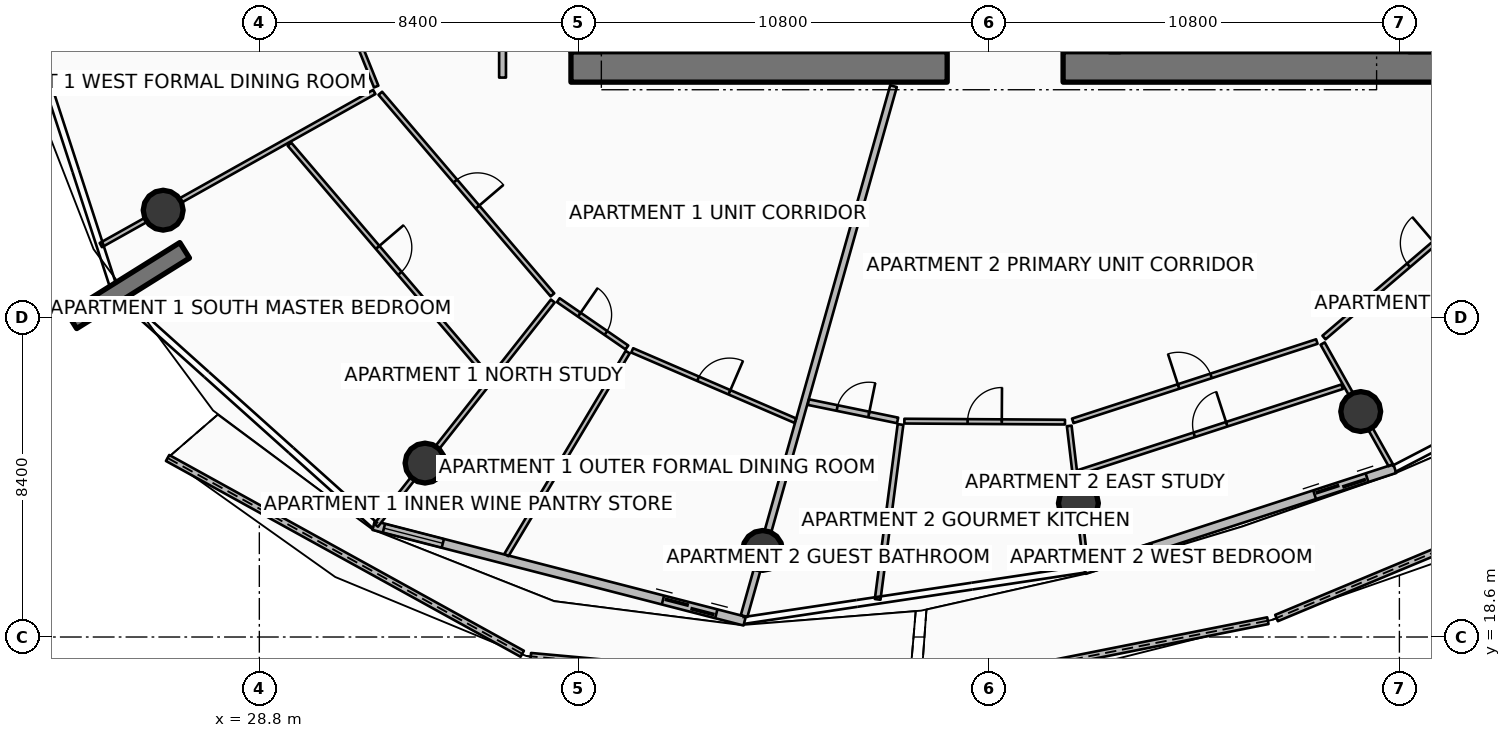
"""IFC4 building model, lengths in metres.
Left out: names, types, materials, properties, quantities, classifications, styles, units other than length and angle.
Written with IfcOpenShell. Run it as: python <this file> out.ifc"""

import sys

from ifc_helpers import new_model, si_unit, direction, frame, frame_2d, origin, origin_2d, place, context, subcontext, project, spatial, polyline, rectangle, circle, outline, extrude, element, fill, save


model = new_model("IFC4")
c1 = context("Model", 3, precision=1e-05, world=origin(), true_north=direction((0.0, 1.0)))
c2 = subcontext(c1, "Body", "Model", "MODEL_VIEW")
j1 = project(units=[si_unit("LENGTHUNIT", "METRE"), si_unit("PLANEANGLEUNIT", "RADIAN")], contexts=[c1])
p1 = place(None, origin())
s1 = spatial("IfcSite", under=j1, at=p1, CompositionType="ELEMENT")
p2 = place(p1, origin())
s2 = spatial("IfcBuilding", under=s1, at=p2, CompositionType="ELEMENT")
p3 = place(p2, frame((0.0, 0.0, 165.3)))
s3 = spatial("IfcBuildingStorey", under=s2, at=p3, CompositionType="ELEMENT", Elevation=165.3)
p4 = place(p3, frame((37.0, 33.6, 0.0), z_axis=(0.0, 0.0, 1.0), x_axis=(1.0, 0.0, 0.0)))
e1 = element("IfcWall", 1, at=p4, inside=s3, PredefinedType="SHEAR", context=c2, shape_type="SweptSolid", body=[
    extrude(rectangle(XDim=9.9, YDim=0.8, at=frame_2d((4.95, 0.0))), origin(), (0.0, 0.0, 1.0), 3.75),
])
p5 = place(p3, frame((49.95, 33.6, 0.0), z_axis=(0.0, 0.0, 1.0), x_axis=(1.0, 0.0, 0.0)))
e2 = element("IfcWall", 2, at=p5, inside=s3, PredefinedType="SHEAR", context=c2, shape_type="SweptSolid", body=[
    extrude(rectangle(XDim=9.9, YDim=0.8, at=frame_2d((4.95, 0.0))), origin(), (0.0, 0.0, 1.0), 3.75),
])
p6 = place(p3, frame((26.835, 28.774, 0.0), z_axis=(0.0, 0.0, 1.0), x_axis=(-0.848053161125, -0.529911158502, 0.0)))
e3 = element("IfcWall", 3, at=p6, inside=s3, PredefinedType="SOLIDWALL", context=c2, shape_type="SweptSolid", body=[
    extrude(rectangle(XDim=3.5, YDim=0.48, at=frame_2d((1.75, 0.0))), origin(), (0.0, 0.0, 1.0), 3.75),
])
for number, where, z_axis, x_axis in (
    (4, (26.27, 29.831, 0.0), (0.0, 0.0, 1.0), (1.0, 0.0, 0.0)),
    (5, (33.16, 23.176, 0.0), (0.0, 0.0, 1.0), (1.0, 0.0, 0.0)),
    (6, (42.043, 20.878, 0.0), (0.0, 0.0, 1.0), (1.0, 0.0, 0.0)),
    (7, (50.353, 22.119, 0.0), (0.0, 0.0, 1.0), (1.0, 0.0, 0.0)),
    (8, (57.782, 24.533, 0.0), (0.0, 0.0, 1.0), (1.0, 0.0, 0.0)),
):
    element("IfcColumn", number, at=place(p3, frame(where, z_axis=z_axis, x_axis=x_axis)), inside=s3, PredefinedType="COLUMN", context=c2, shape_type="SweptSolid", body=[
        extrude(circle(Radius=0.525, at=origin_2d()), origin(), (0.0, 0.0, 1.0), 3.5),
    ])
p7 = place(p3, frame((26.386, 23.311, 0.0), z_axis=(0.0, 0.0, 1.0), x_axis=(0.875451711427, -0.483305597897, 0.0)))
e9 = element("IfcWall", 9, at=p7, inside=s3, PredefinedType="PARAPET", context=c2, shape_type="SweptSolid", body=[
    extrude(outline(polyline([(0.0, 0.0), (10.659, 0.0), (10.659, 1.148), (5.33, 1.127), (0.0, 1.224), (0.0, 0.0)])), frame((0.0, 0.09, 0.0), z_axis=(0.0, -1.0, 0.0), x_axis=(1.0, 0.0, 0.0)), (0.0, 0.0, 1.0), 0.18),
])
p8 = place(p3, frame((35.942, 18.091, 0.0), z_axis=(0.0, 0.0, 1.0), x_axis=(0.995910609801, -0.09034410487, 0.0)))
e10 = element("IfcWall", 10, at=p8, inside=s3, PredefinedType="PARAPET", context=c2, shape_type="SweptSolid", body=[
    extrude(outline(polyline([(0.0, 0.0), (9.993, 0.0), (9.993, 1.483), (4.997, 1.284), (0.0, 1.148), (0.0, 0.0)])), frame((0.0, 0.09, 0.0), z_axis=(0.0, -1.0, 0.0), x_axis=(1.0, 0.0, 0.0)), (0.0, 0.0, 1.0), 0.18),
])
p9 = place(p3, frame((46.201, 17.213, 0.0), z_axis=(0.0, 0.0, 1.0), x_axis=(0.980810829075, 0.194961836188, 0.0)))
e11 = element("IfcWall", 11, at=p9, inside=s3, PredefinedType="PARAPET", context=c2, shape_type="SweptSolid", body=[
    extrude(outline(polyline([(0.0, 0.0), (9.315, 0.0), (9.315, 1.832), (4.658, 1.696), (0.0, 1.497), (0.0, 0.0)])), frame((0.0, 0.09, 0.0), z_axis=(0.0, -1.0, 0.0), x_axis=(1.0, 0.0, 0.0)), (0.0, 0.0, 1.0), 0.18),
])
p10 = place(p3, frame((55.567, 19.099, 0.0), z_axis=(0.0, 0.0, 1.0), x_axis=(0.922918869306, 0.384994494349, 0.0)))
e12 = element("IfcWall", 12, at=p10, inside=s3, PredefinedType="PARAPET", context=c2, shape_type="SweptSolid", body=[
    extrude(outline(polyline([(0.0, 0.0), (9.419, 0.0), (9.419, 1.756), (4.709, 1.853), (0.0, 1.832), (0.0, 0.0)])), frame((0.0, 0.09, 0.0), z_axis=(0.0, -1.0, 0.0), x_axis=(1.0, 0.0, 0.0)), (0.0, 0.0, 1.0), 0.18),
])
p11 = place(p3, frame((31.808, 21.534, 0.0), z_axis=(0.0, 0.0, 1.0), x_axis=(0.968379685126, -0.249481032214, 0.0)))
e13 = element("IfcWall", 13, at=p11, inside=s3, PredefinedType="SOLIDWALL", context=c2, shape_type="SweptSolid", body=[
    extrude(rectangle(XDim=10.082, YDim=0.24, at=frame_2d((5.041, 0.0))), origin(), (0.0, 0.0, 1.0), 2.45),
])
p12 = place(p11, frame((7.862, 0.0, 0.0)))
e14 = element("IfcOpeningElement", 14, at=p12, cuts=e13, PredefinedType="OPENING", context=c2, shape_type="SweptSolid", body=[
    extrude(rectangle(XDim=1.45, YDim=2.15, at=frame_2d((0.725, 1.075))), frame((0.0, 0.13, 0.0), z_axis=(0.0, -1.0, 0.0), x_axis=(1.0, 0.0, 0.0)), (0.0, 0.0, 1.0), 0.26),
])
p13 = place(p11, frame((0.28, 0.0, 0.65)))
e15 = element("IfcOpeningElement", 15, at=p13, cuts=e13, PredefinedType="OPENING", context=c2, shape_type="SweptSolid", body=[
    extrude(rectangle(XDim=1.6, YDim=1.5, at=frame_2d((0.8, 0.75))), frame((0.0, 0.13, 0.0), z_axis=(0.0, -1.0, 0.0), x_axis=(1.0, 0.0, 0.0)), (0.0, 0.0, 1.0), 0.26),
])
p14 = place(p3, frame((50.51, 20.376, 0.0), z_axis=(0.0, 0.0, 1.0), x_axis=(0.951046390632, 0.309048156224, 0.0)))
e16 = element("IfcWall", 16, at=p14, inside=s3, PredefinedType="SOLIDWALL", context=c2, shape_type="SweptSolid", body=[
    extrude(rectangle(XDim=8.59, YDim=0.24, at=frame_2d((4.295, 0.0))), origin(), (0.0, 0.0, 1.0), 2.45),
])
p15 = place(p14, frame((6.37, 0.0, 0.0)))
e17 = element("IfcOpeningElement", 17, at=p15, cuts=e16, PredefinedType="OPENING", context=c2, shape_type="SweptSolid", body=[
    extrude(rectangle(XDim=1.45, YDim=2.15, at=frame_2d((0.725, 1.075))), frame((0.0, 0.13, 0.0), z_axis=(0.0, -1.0, 0.0), x_axis=(1.0, 0.0, 0.0)), (0.0, 0.0, 1.0), 0.26),
])
p16 = place(p14, frame((0.28, 0.0, 0.65)))
e18 = element("IfcOpeningElement", 18, at=p16, cuts=e16, PredefinedType="OPENING", context=c2, shape_type="SweptSolid", body=[
    extrude(rectangle(XDim=1.6, YDim=1.5, at=frame_2d((0.8, 0.75))), frame((0.0, 0.13, 0.0), z_axis=(0.0, -1.0, 0.0), x_axis=(1.0, 0.0, 0.0)), (0.0, 0.0, 1.0), 0.26),
])
p17 = place(p3, frame((45.488, 33.094, 0.0), z_axis=(0.0, 0.0, 1.0), x_axis=(-0.271442952208, -0.962454530717, 0.0)))
e19 = element("IfcWall", 19, at=p17, inside=s3, PredefinedType="PARTITIONING", context=c2, shape_type="SweptSolid", body=[
    extrude(rectangle(XDim=14.486, YDim=0.18, at=frame_2d((7.243, 0.0))), origin(), (0.0, 0.0, 1.0), 2.94),
])
p18 = place(p3, frame((30.185, 37.284, 0.0), z_axis=(0.0, 0.0, 1.0), x_axis=(0.373193309098, -0.927753606322, 0.0)))
e20 = element("IfcWall", 20, at=p18, inside=s3, PredefinedType="PARTITIONING", context=c2, shape_type="SweptSolid", body=[
    extrude(rectangle(XDim=4.528, YDim=0.125, at=frame_2d((2.264, 0.0))), origin(), (0.0, 0.0, 1.0), 2.94),
])
p19 = place(p18, frame((1.814, 0.0, 0.0)))
e21 = element("IfcOpeningElement", 21, at=p19, cuts=e20, PredefinedType="OPENING", context=c2, shape_type="SweptSolid", body=[
    extrude(rectangle(XDim=0.9, YDim=2.08, at=frame_2d((0.45, 1.04))), frame((0.0, 0.073, 0.0), z_axis=(0.0, -1.0, 0.0), x_axis=(1.0, 0.0, 0.0)), (0.0, 0.0, 1.0), 0.145),
])
p20 = place(p3, frame((35.2, 34.712, 0.0), z_axis=(0.0, 0.0, 1.0), x_axis=(0.0, -1.0, 0.0)))
e22 = element("IfcWall", 22, at=p20, inside=s3, PredefinedType="PARTITIONING", context=c2, shape_type="SweptSolid", body=[
    extrude(rectangle(XDim=1.392, YDim=0.18, at=frame_2d((0.696, 0.0))), origin(), (0.0, 0.0, 1.0), 2.94),
])
p21 = place(p3, frame((31.825, 32.941, 0.0), z_axis=(0.0, 0.0, 1.0), x_axis=(-0.872491881101, -0.488628608877, 0.0)))
e23 = element("IfcWall", 23, at=p21, inside=s3, PredefinedType="PARTITIONING", context=c2, shape_type="SweptSolid", body=[
    extrude(rectangle(XDim=8.247, YDim=0.125, at=frame_2d((4.124, 0.0))), origin(), (0.0, 0.0, 1.0), 2.94),
])
p22 = place(p3, frame((31.983, 32.907, 0.0), z_axis=(0.0, 0.0, 1.0), x_axis=(0.649447060425, -0.76040680935, 0.0)))
e24 = element("IfcWall", 24, at=p22, inside=s3, PredefinedType="PARTITIONING", context=c2, shape_type="SweptSolid", body=[
    extrude(rectangle(XDim=6.975, YDim=0.125, at=frame_2d((3.487, 0.0))), origin(), (0.0, 0.0, 1.0), 2.94),
])
p23 = place(p22, frame((3.037, 0.0, 0.0)))
e25 = element("IfcOpeningElement", 25, at=p23, cuts=e24, PredefinedType="OPENING", context=c2, shape_type="SweptSolid", body=[
    extrude(rectangle(XDim=0.9, YDim=2.08, at=frame_2d((0.45, 1.04))), frame((0.0, 0.073, 0.0), z_axis=(0.0, -1.0, 0.0), x_axis=(1.0, 0.0, 0.0)), (0.0, 0.0, 1.0), 0.145),
])
p24 = place(p3, frame((29.593, 31.568, 0.0), z_axis=(0.0, 0.0, 1.0), x_axis=(0.649460624158, -0.760395224649, 0.0)))
e26 = element("IfcWall", 26, at=p24, inside=s3, PredefinedType="PARTITIONING", context=c2, shape_type="SweptSolid", body=[
    extrude(rectangle(XDim=8.044, YDim=0.125, at=frame_2d((4.022, 0.0))), origin(), (0.0, 0.0, 1.0), 2.94),
])
p25 = place(p24, frame((3.572, 0.0, 0.0)))
e27 = element("IfcOpeningElement", 27, at=p25, cuts=e26, PredefinedType="OPENING", context=c2, shape_type="SweptSolid", body=[
    extrude(rectangle(XDim=0.9, YDim=2.08, at=frame_2d((0.45, 1.04))), frame((0.0, 0.073, 0.0), z_axis=(0.0, -1.0, 0.0), x_axis=(1.0, 0.0, 0.0)), (0.0, 0.0, 1.0), 0.145),
])
p26 = place(p3, frame((36.523, 27.441, 0.0), z_axis=(0.0, 0.0, 1.0), x_axis=(-0.619110986016, -0.785303499925, 0.0)))
e28 = element("IfcWall", 28, at=p26, inside=s3, PredefinedType="PARTITIONING", context=c2, shape_type="SweptSolid", body=[
    extrude(rectangle(XDim=7.513, YDim=0.125, at=frame_2d((3.756, 0.0))), origin(), (0.0, 0.0, 1.0), 2.94),
])
p27 = place(p3, frame((38.493, 26.096, 0.0), z_axis=(0.0, 0.0, 1.0), x_axis=(-0.513080671857, -0.858340389453, 0.0)))
e29 = element("IfcWall", 29, at=p27, inside=s3, PredefinedType="PARTITIONING", context=c2, shape_type="SweptSolid", body=[
    extrude(rectangle(XDim=6.219, YDim=0.125, at=frame_2d((3.11, 0.0))), origin(), (0.0, 0.0, 1.0), 2.94),
])
p28 = place(p3, frame((36.667, 27.463, 0.0), z_axis=(0.0, 0.0, 1.0), x_axis=(0.823476398479, -0.567350527582, 0.0)))
e30 = element("IfcWall", 30, at=p28, inside=s3, PredefinedType="PARTITIONING", context=c2, shape_type="SweptSolid", body=[
    extrude(rectangle(XDim=2.193, YDim=0.125, at=frame_2d((1.097, 0.0))), origin(), (0.0, 0.0, 1.0), 2.94),
])
p29 = place(p28, frame((0.672, 0.0, 0.0)))
e31 = element("IfcOpeningElement", 31, at=p29, cuts=e30, PredefinedType="OPENING", context=c2, shape_type="SweptSolid", body=[
    extrude(rectangle(XDim=0.85, YDim=2.06, at=frame_2d((0.425, 1.03))), frame((0.0, 0.073, 0.0), z_axis=(0.0, -1.0, 0.0), x_axis=(1.0, 0.0, 0.0)), (0.0, 0.0, 1.0), 0.145),
])
p30 = place(p3, frame((38.613, 26.142, 0.0), z_axis=(0.0, 0.0, 1.0), x_axis=(0.918381064076, -0.395697133105, 0.0)))
e32 = element("IfcWall", 32, at=p30, inside=s3, PredefinedType="PARTITIONING", context=c2, shape_type="SweptSolid", body=[
    extrude(rectangle(XDim=4.672, YDim=0.125, at=frame_2d((2.336, 0.0))), origin(), (0.0, 0.0, 1.0), 2.94),
])
p31 = place(p30, frame((1.886, 0.0, 0.0)))
e33 = element("IfcOpeningElement", 33, at=p31, cuts=e32, PredefinedType="OPENING", context=c2, shape_type="SweptSolid", body=[
    extrude(rectangle(XDim=0.9, YDim=2.08, at=frame_2d((0.45, 1.04))), frame((0.0, 0.073, 0.0), z_axis=(0.0, -1.0, 0.0), x_axis=(1.0, 0.0, 0.0)), (0.0, 0.0, 1.0), 0.145),
])
p32 = place(p3, frame((43.247, 24.781, 0.0), z_axis=(0.0, 0.0, 1.0), x_axis=(0.979581104341, -0.201049396961, 0.0)))
e34 = element("IfcWall", 34, at=p32, inside=s3, PredefinedType="PARTITIONING", context=c2, shape_type="SweptSolid", body=[
    extrude(rectangle(XDim=2.397, YDim=0.15, at=frame_2d((1.198, 0.0))), origin(), (0.0, 0.0, 1.0), 2.94),
])
p33 = place(p32, frame((0.773, 0.0, 0.0)))
e35 = element("IfcOpeningElement", 35, at=p33, cuts=e34, PredefinedType="OPENING", context=c2, shape_type="SweptSolid", body=[
    extrude(rectangle(XDim=0.85, YDim=2.06, at=frame_2d((0.425, 1.03))), frame((0.0, 0.085, 0.0), z_axis=(0.0, -1.0, 0.0), x_axis=(1.0, 0.0, 0.0)), (0.0, 0.0, 1.0), 0.17),
])
p34 = place(p3, frame((45.672, 24.192, 0.0), z_axis=(0.0, 0.0, 1.0), x_axis=(-0.129620296369, -0.991563703838, 0.0)))
e36 = element("IfcWall", 36, at=p34, inside=s3, PredefinedType="PARTITIONING", context=c2, shape_type="SweptSolid", body=[
    extrude(rectangle(XDim=4.641, YDim=0.15, at=frame_2d((2.32, 0.0))), origin(), (0.0, 0.0, 1.0), 2.94),
])
p35 = place(p3, frame((45.774, 24.28, 0.0), z_axis=(0.0, 0.0, 1.0), x_axis=(0.999981257614, -0.006122452106, 0.0)))
e37 = element("IfcWall", 37, at=p35, inside=s3, PredefinedType="PARTITIONING", context=c2, shape_type="SweptSolid", body=[
    extrude(rectangle(XDim=4.227, YDim=0.125, at=frame_2d((2.113, 0.0))), origin(), (0.0, 0.0, 1.0), 2.94),
])
p36 = place(p35, frame((1.663, 0.0, 0.0)))
e38 = element("IfcOpeningElement", 38, at=p36, cuts=e37, PredefinedType="OPENING", context=c2, shape_type="SweptSolid", body=[
    extrude(rectangle(XDim=0.9, YDim=2.08, at=frame_2d((0.45, 1.04))), frame((0.0, 0.073, 0.0), z_axis=(0.0, -1.0, 0.0), x_axis=(1.0, 0.0, 0.0)), (0.0, 0.0, 1.0), 0.145),
])
p37 = place(p3, frame((50.112, 24.155, 0.0), z_axis=(0.0, 0.0, 1.0), x_axis=(0.117510984651, -0.99307158276, 0.0)))
e39 = element("IfcWall", 39, at=p37, inside=s3, PredefinedType="PARTITIONING", context=c2, shape_type="SweptSolid", body=[
    extrude(rectangle(XDim=3.765, YDim=0.125, at=frame_2d((1.882, 0.0))), origin(), (0.0, 0.0, 1.0), 2.94),
])
p38 = place(p3, frame((50.205, 24.288, 0.0), z_axis=(0.0, 0.0, 1.0), x_axis=(0.951056650279, 0.309016582016, 0.0)))
e40 = element("IfcWall", 40, at=p38, inside=s3, PredefinedType="PARTITIONING", context=c2, shape_type="SweptSolid", body=[
    extrude(rectangle(XDim=6.753, YDim=0.125, at=frame_2d((3.376, 0.0))), origin(), (0.0, 0.0, 1.0), 2.94),
])
p39 = place(p38, frame((2.926, 0.0, 0.0)))
e41 = element("IfcOpeningElement", 41, at=p39, cuts=e40, PredefinedType="OPENING", context=c2, shape_type="SweptSolid", body=[
    extrude(rectangle(XDim=0.9, YDim=2.08, at=frame_2d((0.45, 1.04))), frame((0.0, 0.073, 0.0), z_axis=(0.0, -1.0, 0.0), x_axis=(1.0, 0.0, 0.0)), (0.0, 0.0, 1.0), 0.145),
])
p40 = place(p3, frame((50.365, 22.934, 0.0), z_axis=(0.0, 0.0, 1.0), x_axis=(0.951058941496, 0.309009530274, 0.0)))
e42 = element("IfcWall", 42, at=p40, inside=s3, PredefinedType="PARTITIONING", context=c2, shape_type="SweptSolid", body=[
    extrude(rectangle(XDim=7.284, YDim=0.125, at=frame_2d((3.642, 0.0))), origin(), (0.0, 0.0, 1.0), 2.94),
])
p41 = place(p40, frame((3.192, 0.0, 0.0)))
e43 = element("IfcOpeningElement", 43, at=p41, cuts=e42, PredefinedType="OPENING", context=c2, shape_type="SweptSolid", body=[
    extrude(rectangle(XDim=0.9, YDim=2.08, at=frame_2d((0.45, 1.04))), frame((0.0, 0.073, 0.0), z_axis=(0.0, -1.0, 0.0), x_axis=(1.0, 0.0, 0.0)), (0.0, 0.0, 1.0), 0.145),
])
p42 = place(p3, frame((56.781, 26.321, 0.0), z_axis=(0.0, 0.0, 1.0), x_axis=(0.488615541235, -0.872499199348, 0.0)))
e44 = element("IfcWall", 44, at=p42, inside=s3, PredefinedType="PARTITIONING", context=c2, shape_type="SweptSolid", body=[
    extrude(rectangle(XDim=3.665, YDim=0.125, at=frame_2d((1.832, 0.0))), origin(), (0.0, 0.0, 1.0), 2.94),
])
p43 = place(p3, frame((56.815, 26.48, 0.0), z_axis=(0.0, 0.0, 1.0), x_axis=(0.760406411553, 0.649447526186, 0.0)))
e45 = element("IfcWall", 45, at=p43, inside=s3, PredefinedType="PARTITIONING", context=c2, shape_type="SweptSolid", body=[
    extrude(rectangle(XDim=6.753, YDim=0.125, at=frame_2d((3.376, 0.0))), origin(), (0.0, 0.0, 1.0), 2.94),
])
p44 = place(p43, frame((2.926, 0.0, 0.0)))
e46 = element("IfcOpeningElement", 46, at=p44, cuts=e45, PredefinedType="OPENING", context=c2, shape_type="SweptSolid", body=[
    extrude(rectangle(XDim=0.9, YDim=2.08, at=frame_2d((0.45, 1.04))), frame((0.0, 0.073, 0.0), z_axis=(0.0, -1.0, 0.0), x_axis=(1.0, 0.0, 0.0)), (0.0, 0.0, 1.0), 0.145),
])
p45 = place(p12, origin())
e47 = element("IfcDoor", 47, at=p45, inside=s3, OperationType="DOUBLE_DOOR_SLIDING", PredefinedType="DOOR", context=c2, shape_type="SweptSolid", body=[
    extrude(rectangle(XDim=1.45, YDim=2.15, at=frame_2d((0.725, 1.075))), frame((0.0, 0.025, 0.0), z_axis=(0.0, -1.0, 0.0), x_axis=(1.0, 0.0, 0.0)), (0.0, 0.0, 1.0), 0.05),
])
fill(e14, e47)
p46 = place(p13, origin())
e48 = element("IfcWindow", 48, at=p46, inside=s3, PartitioningType="SINGLE_PANEL", PredefinedType="WINDOW", context=c2, shape_type="SweptSolid", body=[
    extrude(rectangle(XDim=1.6, YDim=1.5, at=frame_2d((0.8, 0.75))), frame((0.0, 0.03, 0.0), z_axis=(0.0, -1.0, 0.0), x_axis=(1.0, 0.0, 0.0)), (0.0, 0.0, 1.0), 0.06),
])
fill(e15, e48)
p47 = place(p15, origin())
e49 = element("IfcDoor", 49, at=p47, inside=s3, OperationType="DOUBLE_DOOR_SLIDING", PredefinedType="DOOR", context=c2, shape_type="SweptSolid", body=[
    extrude(rectangle(XDim=1.45, YDim=2.15, at=frame_2d((0.725, 1.075))), frame((0.0, 0.025, 0.0), z_axis=(0.0, -1.0, 0.0), x_axis=(1.0, 0.0, 0.0)), (0.0, 0.0, 1.0), 0.05),
])
fill(e17, e49)
p48 = place(p16, origin())
e50 = element("IfcWindow", 50, at=p48, inside=s3, PartitioningType="SINGLE_PANEL", PredefinedType="WINDOW", context=c2, shape_type="SweptSolid", body=[
    extrude(rectangle(XDim=1.6, YDim=1.5, at=frame_2d((0.8, 0.75))), frame((0.0, 0.03, 0.0), z_axis=(0.0, -1.0, 0.0), x_axis=(1.0, 0.0, 0.0)), (0.0, 0.0, 1.0), 0.06),
])
fill(e18, e50)
p49 = place(p23, origin())
e51 = element("IfcDoor", 51, at=p49, inside=s3, OperationType="SINGLE_SWING_RIGHT", PredefinedType="DOOR", context=c2, shape_type="SweptSolid", body=[
    extrude(rectangle(XDim=0.9, YDim=2.08, at=frame_2d((0.45, 1.04))), frame((0.0, 0.025, 0.0), z_axis=(0.0, -1.0, 0.0), x_axis=(1.0, 0.0, 0.0)), (0.0, 0.0, 1.0), 0.05),
])
fill(e25, e51)
p50 = place(p25, origin())
e52 = element("IfcDoor", 52, at=p50, inside=s3, OperationType="SINGLE_SWING_LEFT", PredefinedType="DOOR", context=c2, shape_type="SweptSolid", body=[
    extrude(rectangle(XDim=0.9, YDim=2.08, at=frame_2d((0.45, 1.04))), frame((0.0, 0.025, 0.0), z_axis=(0.0, -1.0, 0.0), x_axis=(1.0, 0.0, 0.0)), (0.0, 0.0, 1.0), 0.05),
])
fill(e27, e52)
p51 = place(p29, origin())
e53 = element("IfcDoor", 53, at=p51, inside=s3, OperationType="SINGLE_SWING_LEFT", PredefinedType="DOOR", context=c2, shape_type="SweptSolid", body=[
    extrude(rectangle(XDim=0.85, YDim=2.06, at=frame_2d((0.425, 1.03))), frame((0.0, 0.025, 0.0), z_axis=(0.0, -1.0, 0.0), x_axis=(1.0, 0.0, 0.0)), (0.0, 0.0, 1.0), 0.05),
])
fill(e31, e53)
p52 = place(p31, origin())
e54 = element("IfcDoor", 54, at=p52, inside=s3, OperationType="SINGLE_SWING_RIGHT", PredefinedType="DOOR", context=c2, shape_type="SweptSolid", body=[
    extrude(rectangle(XDim=0.9, YDim=2.08, at=frame_2d((0.45, 1.04))), frame((0.0, 0.025, 0.0), z_axis=(0.0, -1.0, 0.0), x_axis=(1.0, 0.0, 0.0)), (0.0, 0.0, 1.0), 0.05),
])
fill(e33, e54)
p53 = place(p33, origin())
e55 = element("IfcDoor", 55, at=p53, inside=s3, OperationType="SINGLE_SWING_RIGHT", PredefinedType="DOOR", context=c2, shape_type="SweptSolid", body=[
    extrude(rectangle(XDim=0.85, YDim=2.06, at=frame_2d((0.425, 1.03))), frame((0.0, 0.025, 0.0), z_axis=(0.0, -1.0, 0.0), x_axis=(1.0, 0.0, 0.0)), (0.0, 0.0, 1.0), 0.05),
])
fill(e35, e55)
p54 = place(p36, origin())
e56 = element("IfcDoor", 56, at=p54, inside=s3, OperationType="SINGLE_SWING_RIGHT", PredefinedType="DOOR", context=c2, shape_type="SweptSolid", body=[
    extrude(rectangle(XDim=0.9, YDim=2.08, at=frame_2d((0.45, 1.04))), frame((0.0, 0.025, 0.0), z_axis=(0.0, -1.0, 0.0), x_axis=(1.0, 0.0, 0.0)), (0.0, 0.0, 1.0), 0.05),
])
fill(e38, e56)
p55 = place(p39, origin())
e57 = element("IfcDoor", 57, at=p55, inside=s3, OperationType="SINGLE_SWING_LEFT", PredefinedType="DOOR", context=c2, shape_type="SweptSolid", body=[
    extrude(rectangle(XDim=0.9, YDim=2.08, at=frame_2d((0.45, 1.04))), frame((0.0, 0.025, 0.0), z_axis=(0.0, -1.0, 0.0), x_axis=(1.0, 0.0, 0.0)), (0.0, 0.0, 1.0), 0.05),
])
fill(e41, e57)
p56 = place(p41, origin())
e58 = element("IfcDoor", 58, at=p56, inside=s3, OperationType="SINGLE_SWING_RIGHT", PredefinedType="DOOR", context=c2, shape_type="SweptSolid", body=[
    extrude(rectangle(XDim=0.9, YDim=2.08, at=frame_2d((0.45, 1.04))), frame((0.0, 0.025, 0.0), z_axis=(0.0, -1.0, 0.0), x_axis=(1.0, 0.0, 0.0)), (0.0, 0.0, 1.0), 0.05),
])
fill(e43, e58)
p57 = place(p44, origin())
e59 = element("IfcDoor", 59, at=p57, inside=s3, OperationType="SINGLE_SWING_RIGHT", PredefinedType="DOOR", context=c2, shape_type="SweptSolid", body=[
    extrude(rectangle(XDim=0.9, YDim=2.08, at=frame_2d((0.45, 1.04))), frame((0.0, 0.025, 0.0), z_axis=(0.0, -1.0, 0.0), x_axis=(1.0, 0.0, 0.0)), (0.0, 0.0, 1.0), 0.05),
])
fill(e46, e59)
save(model, sys.argv[1])
